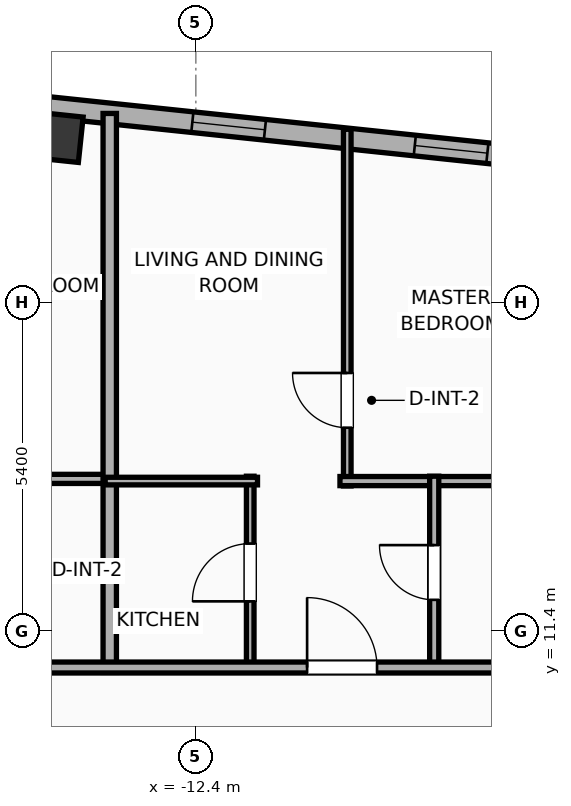
"""IFC4 building model, lengths in metres.
Left out: names, types, materials, properties, quantities, classifications, styles, units other than length and angle.
Written with IfcOpenShell. Run it as: python <this file> out.ifc"""

import sys

from ifc_helpers import new_model, si_unit, direction, frame, frame_2d, origin, origin_2d, place, context, subcontext, project, spatial, rectangle, hollow_rectangle, extrude, element, fill, save


model = new_model("IFC4")
c1 = context("Model", 3, precision=1e-05, world=origin(), true_north=direction((0.0, 1.0)))
c2 = subcontext(c1, "Body", "Model", "MODEL_VIEW")
j1 = project(units=[si_unit("LENGTHUNIT", "METRE"), si_unit("PLANEANGLEUNIT", "RADIAN")], contexts=[c1])
p1 = place(None, origin())
s1 = spatial("IfcSite", under=j1, at=p1, CompositionType="ELEMENT")
p2 = place(p1, origin())
s2 = spatial("IfcBuilding", under=s1, at=p2, CompositionType="ELEMENT")
p3 = place(p2, frame((0.0, 0.0, 283.4)))
s3 = spatial("IfcBuildingStorey", under=s2, at=p3, CompositionType="ELEMENT", Elevation=283.4)
p4 = place(p3, frame((-14.666, 19.518, 0.0), z_axis=(0.0, 0.0, 1.0), x_axis=(0.994521895368, -0.104528463268, 0.0)))
e1 = element("IfcColumn", 1, at=p4, inside=s3, PredefinedType="COLUMN", context=c2, shape_type="SweptSolid", body=[
    extrude(hollow_rectangle(XDim=0.75, YDim=0.75, WallThickness=0.025, at=origin_2d()), origin(), (0.0, 0.0, 1.0), 3.9),
])
p5 = place(p3, frame((-23.908, 20.972, 0.0), z_axis=(0.0, 0.0, 1.0), x_axis=(0.994521888554, -0.104528528102, 0.0)))
e2 = element("IfcWall", 2, at=p5, inside=s3, PredefinedType="ELEMENTEDWALL", context=c2, shape_type="SweptSolid", body=[
    extrude(rectangle(XDim=46.766, YDim=0.34, at=frame_2d((23.383, 0.0))), origin(), (0.0, 0.0, 1.0), 3.65),
])
p6 = place(p5, frame((23.833, 0.0, 0.75)))
e3 = element("IfcOpeningElement", 3, at=p6, cuts=e2, PredefinedType="OPENING", context=c2, shape_type="SweptSolid", body=[
    extrude(rectangle(XDim=2.4, YDim=2.1, at=frame_2d((1.2, 1.05))), frame((0.0, 0.18, 0.0), z_axis=(0.0, -1.0, 0.0), x_axis=(1.0, 0.0, 0.0)), (0.0, 0.0, 1.0), 0.36),
])
p7 = place(p5, frame((1.243, 0.0, 0.75)))
e4 = element("IfcOpeningElement", 4, at=p7, cuts=e2, PredefinedType="OPENING", context=c2, shape_type="SweptSolid", body=[
    extrude(rectangle(XDim=1.2, YDim=2.05, at=frame_2d((0.6, 1.025))), frame((0.0, 0.18, 0.0), z_axis=(0.0, -1.0, 0.0), x_axis=(1.0, 0.0, 0.0)), (0.0, 0.0, 1.0), 0.36),
])
p8 = place(p5, frame((4.157, 0.0, 0.75)))
e5 = element("IfcOpeningElement", 5, at=p8, cuts=e2, PredefinedType="OPENING", context=c2, shape_type="SweptSolid", body=[
    extrude(rectangle(XDim=1.2, YDim=2.05, at=frame_2d((0.6, 1.025))), frame((0.0, 0.18, 0.0), z_axis=(0.0, -1.0, 0.0), x_axis=(1.0, 0.0, 0.0)), (0.0, 0.0, 1.0), 0.36),
])
p9 = place(p5, frame((7.475, 0.0, 0.75)))
e6 = element("IfcOpeningElement", 6, at=p9, cuts=e2, PredefinedType="OPENING", context=c2, shape_type="SweptSolid", body=[
    extrude(rectangle(XDim=1.2, YDim=2.05, at=frame_2d((0.6, 1.025))), frame((0.0, 0.18, 0.0), z_axis=(0.0, -1.0, 0.0), x_axis=(1.0, 0.0, 0.0)), (0.0, 0.0, 1.0), 0.36),
])
p10 = place(p5, frame((11.513, 0.0, 0.75)))
e7 = element("IfcOpeningElement", 7, at=p10, cuts=e2, PredefinedType="OPENING", context=c2, shape_type="SweptSolid", body=[
    extrude(rectangle(XDim=1.2, YDim=2.05, at=frame_2d((0.6, 1.025))), frame((0.0, 0.18, 0.0), z_axis=(0.0, -1.0, 0.0), x_axis=(1.0, 0.0, 0.0)), (0.0, 0.0, 1.0), 0.36),
])
p11 = place(p5, frame((15.192, 0.0, 0.75)))
e8 = element("IfcOpeningElement", 8, at=p11, cuts=e2, PredefinedType="OPENING", context=c2, shape_type="SweptSolid", body=[
    extrude(rectangle(XDim=1.2, YDim=2.05, at=frame_2d((0.6, 1.025))), frame((0.0, 0.18, 0.0), z_axis=(0.0, -1.0, 0.0), x_axis=(1.0, 0.0, 0.0)), (0.0, 0.0, 1.0), 0.36),
])
p12 = place(p5, frame((19.671, 0.0, 0.75)))
e9 = element("IfcOpeningElement", 9, at=p12, cuts=e2, PredefinedType="OPENING", context=c2, shape_type="SweptSolid", body=[
    extrude(rectangle(XDim=1.2, YDim=2.05, at=frame_2d((0.6, 1.025))), frame((0.0, 0.18, 0.0), z_axis=(0.0, -1.0, 0.0), x_axis=(1.0, 0.0, 0.0)), (0.0, 0.0, 1.0), 0.36),
])
p13 = place(p5, frame((29.801, 0.0, 0.75)))
e10 = element("IfcOpeningElement", 10, at=p13, cuts=e2, PredefinedType="OPENING", context=c2, shape_type="SweptSolid", body=[
    extrude(rectangle(XDim=1.2, YDim=2.05, at=frame_2d((0.6, 1.025))), frame((0.0, 0.18, 0.0), z_axis=(0.0, -1.0, 0.0), x_axis=(1.0, 0.0, 0.0)), (0.0, 0.0, 1.0), 0.36),
])
p14 = place(p5, frame((33.35, 0.0, 0.75)))
e11 = element("IfcOpeningElement", 11, at=p14, cuts=e2, PredefinedType="OPENING", context=c2, shape_type="SweptSolid", body=[
    extrude(rectangle(XDim=1.2, YDim=2.05, at=frame_2d((0.6, 1.025))), frame((0.0, 0.18, 0.0), z_axis=(0.0, -1.0, 0.0), x_axis=(1.0, 0.0, 0.0)), (0.0, 0.0, 1.0), 0.36),
])
p15 = place(p5, frame((38.034, 0.0, 0.75)))
e12 = element("IfcOpeningElement", 12, at=p15, cuts=e2, PredefinedType="OPENING", context=c2, shape_type="SweptSolid", body=[
    extrude(rectangle(XDim=0.85, YDim=2.05, at=frame_2d((0.425, 1.025))), frame((0.0, 0.18, 0.0), z_axis=(0.0, -1.0, 0.0), x_axis=(1.0, 0.0, 0.0)), (0.0, 0.0, 1.0), 0.36),
])
p16 = place(p5, frame((40.448, 0.0, 0.75)))
e13 = element("IfcOpeningElement", 13, at=p16, cuts=e2, PredefinedType="OPENING", context=c2, shape_type="SweptSolid", body=[
    extrude(rectangle(XDim=1.2, YDim=2.05, at=frame_2d((0.6, 1.025))), frame((0.0, 0.18, 0.0), z_axis=(0.0, -1.0, 0.0), x_axis=(1.0, 0.0, 0.0)), (0.0, 0.0, 1.0), 0.36),
])
p17 = place(p5, frame((43.718, 0.0, 0.75)))
e14 = element("IfcOpeningElement", 14, at=p17, cuts=e2, PredefinedType="OPENING", context=c2, shape_type="SweptSolid", body=[
    extrude(rectangle(XDim=1.2, YDim=2.05, at=frame_2d((0.6, 1.025))), frame((0.0, 0.18, 0.0), z_axis=(0.0, -1.0, 0.0), x_axis=(1.0, 0.0, 0.0)), (0.0, 0.0, 1.0), 0.36),
])
p18 = place(p3, frame((-17.346, 13.902, 0.0), z_axis=(0.0, 0.0, 1.0), x_axis=(1.0, 0.0, 0.0)))
e15 = element("IfcWall", 15, at=p18, inside=s3, PredefinedType="PLUMBINGWALL", context=c2, shape_type="SweptSolid", body=[
    extrude(rectangle(XDim=3.605, YDim=0.15, at=frame_2d((1.802, 0.0))), origin(), (0.0, 0.0, 1.0), 3.65),
])
p19 = place(p3, frame((-13.816, 10.72, 0.0), z_axis=(0.0, 0.0, 1.0), x_axis=(0.0, 1.0, 0.0)))
e16 = element("IfcWall", 16, at=p19, inside=s3, PredefinedType="PARTITIONING", context=c2, shape_type="SweptSolid", body=[
    extrude(rectangle(XDim=9.192, YDim=0.22, at=frame_2d((4.596, 0.0))), origin(), (0.0, 0.0, 1.0), 3.65),
])
p20 = place(p3, frame((-9.91, 13.786, 0.0), z_axis=(0.0, 0.0, 1.0), x_axis=(0.0, 1.0, 0.0)))
e17 = element("IfcWall", 17, at=p20, inside=s3, PredefinedType="PARTITIONING", context=c2, shape_type="SweptSolid", body=[
    extrude(rectangle(XDim=5.866, YDim=0.125, at=frame_2d((2.933, 0.0))), origin(), (0.0, 0.0, 1.0), 3.65),
])
p21 = place(p20, frame((0.958, 0.0, 0.0)))
e18 = element("IfcOpeningElement", 18, at=p21, cuts=e17, PredefinedType="OPENING", context=c2, shape_type="SweptSolid", body=[
    extrude(rectangle(XDim=0.9, YDim=2.05, at=frame_2d((0.45, 1.025))), frame((0.0, 0.073, 0.0), z_axis=(0.0, -1.0, 0.0), x_axis=(1.0, 0.0, 0.0)), (0.0, 0.0, 1.0), 0.145),
])
p22 = place(p3, frame((-10.03, 13.866, 0.0), z_axis=(0.0, 0.0, 1.0), x_axis=(1.0, 0.0, 0.0)))
e19 = element("IfcWall", 19, at=p22, inside=s3, PredefinedType="PLUMBINGWALL", context=c2, shape_type="SweptSolid", body=[
    extrude(rectangle(XDim=3.79, YDim=0.15, at=frame_2d((1.895, 0.0))), origin(), (0.0, 0.0, 1.0), 3.65),
])
p23 = place(p3, frame((-11.506, 10.78, 0.0), z_axis=(0.0, 0.0, 1.0), x_axis=(0.0, 1.0, 0.0)))
e20 = element("IfcWall", 20, at=p23, inside=s3, PredefinedType="PARTITIONING", context=c2, shape_type="SweptSolid", body=[
    extrude(rectangle(XDim=3.166, YDim=0.125, at=frame_2d((1.583, 0.0))), origin(), (0.0, 0.0, 1.0), 3.65),
])
p24 = place(p23, frame((1.108, 0.0, 0.0)))
e21 = element("IfcOpeningElement", 21, at=p24, cuts=e20, PredefinedType="OPENING", context=c2, shape_type="SweptSolid", body=[
    extrude(rectangle(XDim=0.95, YDim=2.05, at=frame_2d((0.475, 1.025))), frame((0.0, 0.073, 0.0), z_axis=(0.0, -1.0, 0.0), x_axis=(1.0, 0.0, 0.0)), (0.0, 0.0, 1.0), 0.145),
])
p25 = place(p3, frame((-13.891, 13.866, 0.0), z_axis=(0.0, 0.0, 1.0), x_axis=(1.0, 0.0, 0.0)))
e22 = element("IfcWall", 22, at=p25, inside=s3, PredefinedType="PARTITIONING", context=c2, shape_type="SweptSolid", body=[
    extrude(rectangle(XDim=2.505, YDim=0.125, at=frame_2d((1.252, 0.0))), origin(), (0.0, 0.0, 1.0), 3.65),
])
p26 = place(p3, frame((-8.48, 10.78, 0.0), z_axis=(0.0, 0.0, 1.0), x_axis=(0.0, 1.0, 0.0)))
e23 = element("IfcWall", 23, at=p26, inside=s3, PredefinedType="PLUMBINGWALL", context=c2, shape_type="SweptSolid", body=[
    extrude(rectangle(XDim=3.166, YDim=0.15, at=frame_2d((1.583, 0.0))), origin(), (0.0, 0.0, 1.0), 3.65),
])
p27 = place(p26, frame((1.133, 0.0, 0.0)))
e24 = element("IfcOpeningElement", 24, at=p27, cuts=e23, PredefinedType="OPENING", context=c2, shape_type="SweptSolid", body=[
    extrude(rectangle(XDim=0.9, YDim=2.05, at=frame_2d((0.45, 1.025))), frame((0.0, 0.085, 0.0), z_axis=(0.0, -1.0, 0.0), x_axis=(1.0, 0.0, 0.0)), (0.0, 0.0, 1.0), 0.17),
])
p28 = place(p3, frame((-28.443, 10.8, 0.0), z_axis=(0.0, 0.0, 1.0), x_axis=(1.0, 0.0, 0.0)))
e25 = element("IfcWall", 25, at=p28, inside=s3, PredefinedType="PARTITIONING", context=c2, shape_type="SweptSolid", body=[
    extrude(rectangle(XDim=53.956, YDim=0.18, at=frame_2d((26.978, 0.0))), origin(), (0.0, 0.0, 1.0), 3.65),
])
p29 = place(p28, frame((3.213, 0.0, 0.0)))
e26 = element("IfcOpeningElement", 26, at=p29, cuts=e25, PredefinedType="OPENING", context=c2, shape_type="SweptSolid", body=[
    extrude(rectangle(XDim=1.15, YDim=2.05, at=frame_2d((0.575, 1.025))), frame((0.0, 0.1, 0.0), z_axis=(0.0, -1.0, 0.0), x_axis=(1.0, 0.0, 0.0)), (0.0, 0.0, 1.0), 0.2),
])
p30 = place(p28, frame((10.556, 0.0, 0.0)))
e27 = element("IfcOpeningElement", 27, at=p30, cuts=e25, PredefinedType="OPENING", context=c2, shape_type="SweptSolid", body=[
    extrude(rectangle(XDim=1.15, YDim=2.05, at=frame_2d((0.575, 1.025))), frame((0.0, 0.1, 0.0), z_axis=(0.0, -1.0, 0.0), x_axis=(1.0, 0.0, 0.0)), (0.0, 0.0, 1.0), 0.2),
])
p31 = place(p28, frame((17.872, 0.0, 0.0)))
e28 = element("IfcOpeningElement", 28, at=p31, cuts=e25, PredefinedType="OPENING", context=c2, shape_type="SweptSolid", body=[
    extrude(rectangle(XDim=1.15, YDim=2.05, at=frame_2d((0.575, 1.025))), frame((0.0, 0.1, 0.0), z_axis=(0.0, -1.0, 0.0), x_axis=(1.0, 0.0, 0.0)), (0.0, 0.0, 1.0), 0.2),
])
p32 = place(p28, frame((24.45, 0.0, 0.0)))
e29 = element("IfcOpeningElement", 29, at=p32, cuts=e25, PredefinedType="OPENING", context=c2, shape_type="SweptSolid", body=[
    extrude(rectangle(XDim=0.9, YDim=2.05, at=frame_2d((0.45, 1.025))), frame((0.0, 0.1, 0.0), z_axis=(0.0, -1.0, 0.0), x_axis=(1.0, 0.0, 0.0)), (0.0, 0.0, 1.0), 0.2),
])
p33 = place(p28, frame((29.954, 0.0, 0.0)))
e30 = element("IfcOpeningElement", 30, at=p33, cuts=e25, PredefinedType="OPENING", context=c2, shape_type="SweptSolid", body=[
    extrude(rectangle(XDim=0.9, YDim=2.05, at=frame_2d((0.45, 1.025))), frame((0.0, 0.1, 0.0), z_axis=(0.0, -1.0, 0.0), x_axis=(1.0, 0.0, 0.0)), (0.0, 0.0, 1.0), 0.2),
])
p34 = place(p28, frame((36.186, 0.0, 0.0)))
e31 = element("IfcOpeningElement", 31, at=p34, cuts=e25, PredefinedType="OPENING", context=c2, shape_type="SweptSolid", body=[
    extrude(rectangle(XDim=0.9, YDim=2.05, at=frame_2d((0.45, 1.025))), frame((0.0, 0.1, 0.0), z_axis=(0.0, -1.0, 0.0), x_axis=(1.0, 0.0, 0.0)), (0.0, 0.0, 1.0), 0.2),
])
p35 = place(p28, frame((43.249, 0.0, 0.0)))
e32 = element("IfcOpeningElement", 32, at=p35, cuts=e25, PredefinedType="OPENING", context=c2, shape_type="SweptSolid", body=[
    extrude(rectangle(XDim=0.9, YDim=2.05, at=frame_2d((0.45, 1.025))), frame((0.0, 0.1, 0.0), z_axis=(0.0, -1.0, 0.0), x_axis=(1.0, 0.0, 0.0)), (0.0, 0.0, 1.0), 0.2),
])
p36 = place(p28, frame((50.311, 0.0, 0.0)))
e33 = element("IfcOpeningElement", 33, at=p36, cuts=e25, PredefinedType="OPENING", context=c2, shape_type="SweptSolid", body=[
    extrude(rectangle(XDim=0.9, YDim=2.05, at=frame_2d((0.45, 1.025))), frame((0.0, 0.1, 0.0), z_axis=(0.0, -1.0, 0.0), x_axis=(1.0, 0.0, 0.0)), (0.0, 0.0, 1.0), 0.2),
])
p37 = place(p10, origin())
e34 = element("IfcWindow", 34, at=p37, inside=s3, PartitioningType="SINGLE_PANEL", PredefinedType="WINDOW", context=c2, shape_type="SweptSolid", body=[
    extrude(rectangle(XDim=1.2, YDim=2.05, at=frame_2d((0.6, 1.025))), frame((0.0, 0.03, 0.0), z_axis=(0.0, -1.0, 0.0), x_axis=(1.0, 0.0, 0.0)), (0.0, 0.0, 1.0), 0.06),
])
fill(e7, e34)
p38 = place(p11, origin())
e35 = element("IfcWindow", 35, at=p38, inside=s3, PartitioningType="SINGLE_PANEL", PredefinedType="WINDOW", context=c2, shape_type="SweptSolid", body=[
    extrude(rectangle(XDim=1.2, YDim=2.05, at=frame_2d((0.6, 1.025))), frame((0.0, 0.03, 0.0), z_axis=(0.0, -1.0, 0.0), x_axis=(1.0, 0.0, 0.0)), (0.0, 0.0, 1.0), 0.06),
])
fill(e8, e35)
p39 = place(p21, origin())
e36 = element("IfcDoor", 36, at=p39, inside=s3, OperationType="SINGLE_SWING_RIGHT", PredefinedType="DOOR", context=c2, shape_type="SweptSolid", body=[
    extrude(rectangle(XDim=0.9, YDim=2.05, at=frame_2d((0.45, 1.025))), frame((0.0, 0.025, 0.0), z_axis=(0.0, -1.0, 0.0), x_axis=(1.0, 0.0, 0.0)), (0.0, 0.0, 1.0), 0.05),
])
fill(e18, e36)
p40 = place(p24, origin())
e37 = element("IfcDoor", 37, at=p40, inside=s3, OperationType="SINGLE_SWING_LEFT", PredefinedType="DOOR", context=c2, shape_type="SweptSolid", body=[
    extrude(rectangle(XDim=0.95, YDim=2.05, at=frame_2d((0.475, 1.025))), frame((0.0, 0.025, 0.0), z_axis=(0.0, -1.0, 0.0), x_axis=(1.0, 0.0, 0.0)), (0.0, 0.0, 1.0), 0.05),
])
fill(e21, e37)
p41 = place(p27, origin())
e38 = element("IfcDoor", 38, at=p41, inside=s3, OperationType="SINGLE_SWING_RIGHT", PredefinedType="DOOR", context=c2, shape_type="SweptSolid", body=[
    extrude(rectangle(XDim=0.9, YDim=2.05, at=frame_2d((0.45, 1.025))), frame((0.0, 0.025, 0.0), z_axis=(0.0, -1.0, 0.0), x_axis=(1.0, 0.0, 0.0)), (0.0, 0.0, 1.0), 0.05),
])
fill(e24, e38)
p42 = place(p31, origin())
e39 = element("IfcDoor", 39, at=p42, inside=s3, OperationType="SINGLE_SWING_LEFT", PredefinedType="DOOR", context=c2, shape_type="SweptSolid", body=[
    extrude(rectangle(XDim=1.15, YDim=2.05, at=frame_2d((0.575, 1.025))), frame((0.0, 0.025, 0.0), z_axis=(0.0, -1.0, 0.0), x_axis=(1.0, 0.0, 0.0)), (0.0, 0.0, 1.0), 0.05),
])
fill(e28, e39)
save(model, sys.argv[1])
